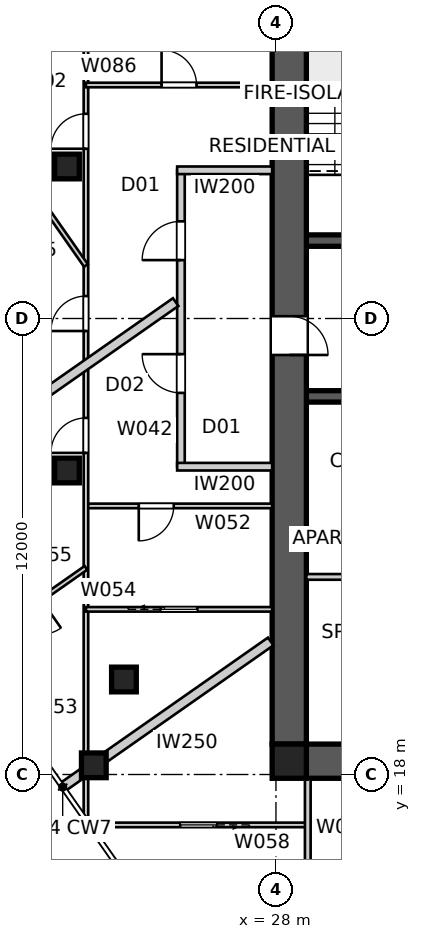
"""IFC4 building model, lengths in metres.
Left out: names, types, materials, properties, quantities, classifications, styles, units other than length and angle.
Written with IfcOpenShell. Run it as: python <this file> out.ifc"""

import sys

from ifc_helpers import new_model, si_unit, direction, frame, frame_2d, origin, origin_2d, place, context, subcontext, project, spatial, polyline, rectangle, outline, extrude, element, fill, save


model = new_model("IFC4")
c1 = context("Model", 3, precision=1e-05, world=origin(), true_north=direction((0.0, 1.0)))
c2 = subcontext(c1, "Body", "Model", "MODEL_VIEW")
j1 = project(units=[si_unit("LENGTHUNIT", "METRE"), si_unit("PLANEANGLEUNIT", "RADIAN")], contexts=[c1])
p1 = place(None, origin())
s1 = spatial("IfcSite", under=j1, at=p1, CompositionType="ELEMENT")
p2 = place(p1, origin())
s2 = spatial("IfcBuilding", under=s1, at=p2, CompositionType="ELEMENT")
p3 = place(p2, frame((0.0, 0.0, 247.2)))
s3 = spatial("IfcBuildingStorey", under=s2, at=p3, CompositionType="ELEMENT", Elevation=247.2)
p4 = place(p3, frame((51.2, 18.35, 0.0), z_axis=(0.0, 0.0, 1.0), x_axis=(-1.0, 0.0, 0.0)))
e1 = element("IfcWall", 1, at=p4, inside=s3, PredefinedType="SHEAR", context=c2, shape_type="SweptSolid", body=[
    extrude(outline(polyline([(0.0, -0.45), (22.4, -0.45), (22.4, -0.025), (22.85, -0.025), (22.85, 0.025), (22.4, 0.025), (22.4, 0.45), (0.0, 0.45), (0.0, 0.025), (-0.45, 0.025), (-0.45, -0.025), (0.0, -0.025), (0.0, -0.45)])), origin(), (0.0, 0.0, 1.0), 3.4),
])
p5 = place(p3, frame((28.35, 41.2, 0.0), z_axis=(0.0, 0.0, 1.0), x_axis=(0.0, -1.0, 0.0)))
e2 = element("IfcWall", 2, at=p5, inside=s3, PredefinedType="SHEAR", context=c2, shape_type="SweptSolid", body=[
    extrude(outline(polyline([(0.0, -0.45), (22.4, -0.45), (22.4, -0.025), (22.85, -0.025), (22.85, 0.025), (22.4, 0.025), (22.4, 0.45), (0.0, 0.45), (0.0, 0.025), (-0.45, 0.025), (-0.45, -0.025), (0.0, -0.025), (0.0, -0.45)])), origin(), (0.0, 0.0, 1.0), 3.4),
])
p6 = place(p5, frame((11.14, 0.0, 0.0)))
e3 = element("IfcOpeningElement", 3, at=p6, cuts=e2, PredefinedType="OPENING", context=c2, shape_type="SweptSolid", body=[
    extrude(rectangle(XDim=1.02, YDim=2.4, at=frame_2d((0.51, 1.2))), frame((0.0, 0.46, 0.0), z_axis=(0.0, -1.0, 0.0), x_axis=(1.0, 0.0, 0.0)), (0.0, 0.0, 1.0), 0.92),
])
p7 = place(p3, frame((28.8, 32.05, 0.0), z_axis=(0.0, 0.0, 1.0), x_axis=(1.0, 0.0, 0.0)))
e4 = element("IfcWall", 4, at=p7, inside=s3, PredefinedType="SHEAR", context=c2, shape_type="SweptSolid", body=[
    extrude(rectangle(XDim=22.4, YDim=0.3, at=frame_2d((11.2, 0.0))), origin(), (0.0, 0.0, 1.0), 3.4),
])
p8 = place(p7, frame((19.04, 0.0, 0.0)))
e5 = element("IfcOpeningElement", 5, at=p8, cuts=e4, PredefinedType="OPENING", context=c2, shape_type="SweptSolid", body=[
    extrude(rectangle(XDim=0.92, YDim=2.1, at=frame_2d((0.46, 1.05))), frame((0.0, 0.16, 0.0), z_axis=(0.0, -1.0, 0.0), x_axis=(1.0, 0.0, 0.0)), (0.0, 0.0, 1.0), 0.32),
])
p9 = place(p7, frame((1.265, 0.0, 0.0)))
e6 = element("IfcOpeningElement", 6, at=p9, cuts=e4, PredefinedType="OPENING", context=c2, shape_type="SweptSolid", body=[
    extrude(rectangle(XDim=1.02, YDim=2.1, at=frame_2d((0.51, 1.05))), frame((0.0, 0.16, 0.0), z_axis=(0.0, -1.0, 0.0), x_axis=(1.0, 0.0, 0.0)), (0.0, 0.0, 1.0), 0.32),
])
p10 = place(p7, frame((4.015, 0.0, 0.0)))
e7 = element("IfcOpeningElement", 7, at=p10, cuts=e4, PredefinedType="OPENING", context=c2, shape_type="SweptSolid", body=[
    extrude(rectangle(XDim=0.92, YDim=2.1, at=frame_2d((0.46, 1.05))), frame((0.0, 0.16, 0.0), z_axis=(0.0, -1.0, 0.0), x_axis=(1.0, 0.0, 0.0)), (0.0, 0.0, 1.0), 0.32),
])
p11 = place(p7, frame((7.015, 0.0, 0.0)))
e8 = element("IfcOpeningElement", 8, at=p11, cuts=e4, PredefinedType="OPENING", context=c2, shape_type="SweptSolid", body=[
    extrude(rectangle(XDim=0.92, YDim=2.1, at=frame_2d((0.46, 1.05))), frame((0.0, 0.16, 0.0), z_axis=(0.0, -1.0, 0.0), x_axis=(1.0, 0.0, 0.0)), (0.0, 0.0, 1.0), 0.32),
])
p12 = place(p7, frame((9.34, 0.0, 0.0)))
e9 = element("IfcOpeningElement", 9, at=p12, cuts=e4, PredefinedType="OPENING", context=c2, shape_type="SweptSolid", body=[
    extrude(rectangle(XDim=0.92, YDim=2.1, at=frame_2d((0.46, 1.05))), frame((0.0, 0.16, 0.0), z_axis=(0.0, -1.0, 0.0), x_axis=(1.0, 0.0, 0.0)), (0.0, 0.0, 1.0), 0.32),
])
p13 = place(p7, frame((12.05, 0.0, 0.0)))
e10 = element("IfcOpeningElement", 10, at=p13, cuts=e4, PredefinedType="OPENING", context=c2, shape_type="SweptSolid", body=[
    extrude(rectangle(XDim=1.1, YDim=2.1, at=frame_2d((0.55, 1.05))), frame((0.0, 0.16, 0.0), z_axis=(0.0, -1.0, 0.0), x_axis=(1.0, 0.0, 0.0)), (0.0, 0.0, 1.0), 0.32),
])
p14 = place(p7, frame((14.85, 0.0, 0.0)))
e11 = element("IfcOpeningElement", 11, at=p14, cuts=e4, PredefinedType="OPENING", context=c2, shape_type="SweptSolid", body=[
    extrude(rectangle(XDim=1.1, YDim=2.1, at=frame_2d((0.55, 1.05))), frame((0.0, 0.16, 0.0), z_axis=(0.0, -1.0, 0.0), x_axis=(1.0, 0.0, 0.0)), (0.0, 0.0, 1.0), 0.32),
])
p15 = place(p3, frame((51.2, 27.95, 0.0), z_axis=(0.0, 0.0, 1.0), x_axis=(-1.0, 0.0, 0.0)))
e12 = element("IfcWall", 12, at=p15, inside=s3, PredefinedType="SHEAR", context=c2, shape_type="SweptSolid", body=[
    extrude(rectangle(XDim=22.4, YDim=0.3, at=frame_2d((11.2, 0.0))), origin(), (0.0, 0.0, 1.0), 3.4),
])
p16 = place(p15, frame((19.04, 0.0, 0.0)))
e13 = element("IfcOpeningElement", 13, at=p16, cuts=e12, PredefinedType="OPENING", context=c2, shape_type="SweptSolid", body=[
    extrude(rectangle(XDim=0.92, YDim=2.1, at=frame_2d((0.46, 1.05))), frame((0.0, 0.16, 0.0), z_axis=(0.0, -1.0, 0.0), x_axis=(1.0, 0.0, 0.0)), (0.0, 0.0, 1.0), 0.32),
])
p17 = place(p15, frame((1.265, 0.0, 0.0)))
e14 = element("IfcOpeningElement", 14, at=p17, cuts=e12, PredefinedType="OPENING", context=c2, shape_type="SweptSolid", body=[
    extrude(rectangle(XDim=1.02, YDim=2.1, at=frame_2d((0.51, 1.05))), frame((0.0, 0.16, 0.0), z_axis=(0.0, -1.0, 0.0), x_axis=(1.0, 0.0, 0.0)), (0.0, 0.0, 1.0), 0.32),
])
p18 = place(p15, frame((4.015, 0.0, 0.0)))
e15 = element("IfcOpeningElement", 15, at=p18, cuts=e12, PredefinedType="OPENING", context=c2, shape_type="SweptSolid", body=[
    extrude(rectangle(XDim=0.92, YDim=2.1, at=frame_2d((0.46, 1.05))), frame((0.0, 0.16, 0.0), z_axis=(0.0, -1.0, 0.0), x_axis=(1.0, 0.0, 0.0)), (0.0, 0.0, 1.0), 0.32),
])
p19 = place(p15, frame((9.79, 0.0, 0.0)))
e16 = element("IfcOpeningElement", 16, at=p19, cuts=e12, PredefinedType="OPENING", context=c2, shape_type="SweptSolid", body=[
    extrude(rectangle(XDim=0.92, YDim=2.1, at=frame_2d((0.46, 1.05))), frame((0.0, 0.16, 0.0), z_axis=(0.0, -1.0, 0.0), x_axis=(1.0, 0.0, 0.0)), (0.0, 0.0, 1.0), 0.32),
])
p20 = place(p15, frame((6.115, 0.0, 0.0)))
e17 = element("IfcOpeningElement", 17, at=p20, cuts=e12, PredefinedType="OPENING", context=c2, shape_type="SweptSolid", body=[
    extrude(rectangle(XDim=0.92, YDim=2.1, at=frame_2d((0.46, 1.05))), frame((0.0, 0.16, 0.0), z_axis=(0.0, -1.0, 0.0), x_axis=(1.0, 0.0, 0.0)), (0.0, 0.0, 1.0), 0.32),
])
p21 = place(p15, frame((12.05, 0.0, 0.0)))
e18 = element("IfcOpeningElement", 18, at=p21, cuts=e12, PredefinedType="OPENING", context=c2, shape_type="SweptSolid", body=[
    extrude(rectangle(XDim=1.1, YDim=2.1, at=frame_2d((0.55, 1.05))), frame((0.0, 0.16, 0.0), z_axis=(0.0, -1.0, 0.0), x_axis=(1.0, 0.0, 0.0)), (0.0, 0.0, 1.0), 0.32),
])
p22 = place(p15, frame((14.85, 0.0, 0.0)))
e19 = element("IfcOpeningElement", 19, at=p22, cuts=e12, PredefinedType="OPENING", context=c2, shape_type="SweptSolid", body=[
    extrude(rectangle(XDim=1.1, YDim=2.1, at=frame_2d((0.55, 1.05))), frame((0.0, 0.16, 0.0), z_axis=(0.0, -1.0, 0.0), x_axis=(1.0, 0.0, 0.0)), (0.0, 0.0, 1.0), 0.32),
])
p23 = place(p3, frame((28.35, 18.35, 0.0), z_axis=(0.0, 0.0, 1.0), x_axis=(1.0, 0.0, 0.0)))
e20 = element("IfcColumn", 20, at=p23, inside=s3, PredefinedType="COLUMN", context=c2, shape_type="SweptSolid", body=[
    extrude(rectangle(XDim=0.9, YDim=0.9, at=origin_2d()), origin(), (0.0, 0.0, 1.0), 3.4),
])
for number, where, z_axis, x_axis in (
    (21, (23.207, 18.242, 0.0), (0.0, 0.0, 1.0), (1.0, 0.0, 0.0)),
    (22, (22.5, 34.0, 0.0), (0.0, 0.0, 1.0), (1.0, 0.0, 0.0)),
    (23, (22.5, 26.0, 0.0), (0.0, 0.0, 1.0), (1.0, 0.0, 0.0)),
    (24, (24.0, 20.5, 0.0), (0.0, 0.0, 1.0), (1.0, 0.0, 0.0)),
):
    element("IfcColumn", number, at=place(p3, frame(where, z_axis=z_axis, x_axis=x_axis)), inside=s3, PredefinedType="COLUMN", context=c2, shape_type="SweptSolid", body=[
        extrude(rectangle(XDim=0.65, YDim=0.65, at=origin_2d()), origin(), (0.0, 0.0, 1.0), 3.4),
    ])
p24 = place(p3, frame((25.5, 26.1, 0.0), z_axis=(0.0, 0.0, 1.0), x_axis=(0.0, 1.0, 0.0)))
e25 = element("IfcWall", 25, at=p24, inside=s3, PredefinedType="PARTITIONING", context=c2, shape_type="SweptSolid", body=[
    extrude(rectangle(XDim=7.8, YDim=0.2, at=frame_2d((3.9, 0.0))), origin(), (0.0, 0.0, 1.0), 3.25),
])
p25 = place(p24, frame((1.942, 0.0, 0.0)))
e26 = element("IfcOpeningElement", 26, at=p25, cuts=e25, PredefinedType="OPENING", context=c2, shape_type="SweptSolid", body=[
    extrude(rectangle(XDim=1.02, YDim=2.34, at=frame_2d((0.51, 1.17))), frame((0.0, 0.11, 0.0), z_axis=(0.0, -1.0, 0.0), x_axis=(1.0, 0.0, 0.0)), (0.0, 0.0, 1.0), 0.22),
])
p26 = place(p24, frame((5.437, 0.0, 0.0)))
e27 = element("IfcOpeningElement", 27, at=p26, cuts=e25, PredefinedType="OPENING", context=c2, shape_type="SweptSolid", body=[
    extrude(rectangle(XDim=1.02, YDim=2.34, at=frame_2d((0.51, 1.17))), frame((0.0, 0.11, 0.0), z_axis=(0.0, -1.0, 0.0), x_axis=(1.0, 0.0, 0.0)), (0.0, 0.0, 1.0), 0.22),
])
for number, where, z_axis, x_axis in (
    (28, (27.9, 33.9, 0.0), (0.0, 0.0, 1.0), (-1.0, 0.0, 0.0)),
    (29, (27.9, 26.1, 0.0), (0.0, 0.0, 1.0), (-1.0, 0.0, 0.0)),
):
    element("IfcWall", number, at=place(p3, frame(where, z_axis=z_axis, x_axis=x_axis)), inside=s3, PredefinedType="PARTITIONING", context=c2, shape_type="SweptSolid", body=[
        extrude(rectangle(XDim=2.5, YDim=0.2, at=frame_2d((1.25, 0.0))), origin(), (0.0, 0.0, 1.0), 3.25),
    ])
p27 = place(p3, frame((22.388, 17.668, 0.0), z_axis=(0.0, 0.0, 1.0), x_axis=(0.819161528122, 0.573562891796, 0.0)))
e30 = element("IfcWall", 30, at=p27, inside=s3, PredefinedType="PARTITIONING", context=c2, shape_type="SweptSolid", body=[
    extrude(rectangle(XDim=6.681, YDim=0.25, at=frame_2d((3.341, 0.0))), origin(), (0.0, 0.0, 1.0), 3.25),
])
p28 = place(p3, frame((17.369, 24.836, 0.0), z_axis=(0.0, 0.0, 1.0), x_axis=(0.81915902312, 0.573566469418, 0.0)))
e31 = element("IfcWall", 31, at=p28, inside=s3, PredefinedType="PARTITIONING", context=c2, shape_type="SweptSolid", body=[
    extrude(rectangle(XDim=9.756, YDim=0.25, at=frame_2d((4.878, 0.0))), origin(), (0.0, 0.0, 1.0), 3.25),
])
p29 = place(p3, frame((32.4, 23.2, 0.0), z_axis=(0.0, 0.0, 1.0), x_axis=(-1.0, 0.0, 0.0)))
e32 = element("IfcWall", 32, at=p29, inside=s3, PredefinedType="SOLIDWALL", context=c2, shape_type="SweptSolid", body=[
    extrude(rectangle(XDim=3.6, YDim=0.15, at=frame_2d((1.8, 0.0))), origin(), (0.0, 0.0, 1.0), 3.25),
])
p30 = place(p29, frame((1.34, 0.0, 0.0)))
e33 = element("IfcOpeningElement", 33, at=p30, cuts=e32, PredefinedType="OPENING", context=c2, shape_type="SweptSolid", body=[
    extrude(rectangle(XDim=0.92, YDim=2.1, at=frame_2d((0.46, 1.05))), frame((0.0, 0.085, 0.0), z_axis=(0.0, -1.0, 0.0), x_axis=(1.0, 0.0, 0.0)), (0.0, 0.0, 1.0), 0.17),
])
p31 = place(p3, frame((27.9, 25.068, 0.0), z_axis=(0.0, 0.0, 1.0), x_axis=(-1.0, 0.0, 0.0)))
e34 = element("IfcWall", 34, at=p31, inside=s3, PredefinedType="PARTITIONING", context=c2, shape_type="SweptSolid", body=[
    extrude(rectangle(XDim=4.9, YDim=0.12, at=frame_2d((2.45, 0.0))), origin(), (0.0, 0.0, 1.0), 3.25),
])
p32 = place(p31, frame((2.59, 0.0, 0.0)))
e35 = element("IfcOpeningElement", 35, at=p32, cuts=e34, PredefinedType="OPENING", context=c2, shape_type="SweptSolid", body=[
    extrude(rectangle(XDim=0.92, YDim=2.34, at=frame_2d((0.46, 1.17))), frame((0.0, 0.07, 0.0), z_axis=(0.0, -1.0, 0.0), x_axis=(1.0, 0.0, 0.0)), (0.0, 0.0, 1.0), 0.14),
])
p33 = place(p3, frame((23.0, 16.864, 0.0), z_axis=(0.0, 0.0, 1.0), x_axis=(0.0, 1.0, 0.0)))
e36 = element("IfcWall", 36, at=p33, inside=s3, PredefinedType="PARTITIONING", context=c2, shape_type="SweptSolid", body=[
    extrude(rectangle(XDim=26.824, YDim=0.12, at=frame_2d((13.412, 0.0))), origin(), (0.0, 0.0, 1.0), 2.55),
])
p34 = place(p33, frame((9.599, 0.0, 0.0)))
e37 = element("IfcOpeningElement", 37, at=p34, cuts=e36, PredefinedType="OPENING", context=c2, shape_type="SweptSolid", body=[
    extrude(rectangle(XDim=0.92, YDim=2.34, at=frame_2d((0.46, 1.17))), frame((0.0, 0.07, 0.0), z_axis=(0.0, -1.0, 0.0), x_axis=(1.0, 0.0, 0.0)), (0.0, 0.0, 1.0), 0.14),
])
p35 = place(p33, frame((17.603, 0.0, 0.0)))
e38 = element("IfcOpeningElement", 38, at=p35, cuts=e36, PredefinedType="OPENING", context=c2, shape_type="SweptSolid", body=[
    extrude(rectangle(XDim=0.92, YDim=2.34, at=frame_2d((0.46, 1.17))), frame((0.0, 0.07, 0.0), z_axis=(0.0, -1.0, 0.0), x_axis=(1.0, 0.0, 0.0)), (0.0, 0.0, 1.0), 0.14),
])
p36 = place(p33, frame((12.806, 0.0, 0.0)))
e39 = element("IfcOpeningElement", 39, at=p36, cuts=e36, PredefinedType="OPENING", context=c2, shape_type="SweptSolid", body=[
    extrude(rectangle(XDim=0.92, YDim=2.34, at=frame_2d((0.46, 1.17))), frame((0.0, 0.07, 0.0), z_axis=(0.0, -1.0, 0.0), x_axis=(1.0, 0.0, 0.0)), (0.0, 0.0, 1.0), 0.14),
])
p37 = place(p3, frame((23.0, 22.347, 0.0), z_axis=(0.0, 0.0, 1.0), x_axis=(1.0, 0.0, 0.0)))
e40 = element("IfcWall", 40, at=p37, inside=s3, PredefinedType="PARTITIONING", context=c2, shape_type="SweptSolid", body=[
    extrude(rectangle(XDim=4.9, YDim=0.12, at=frame_2d((2.45, 0.0))), origin(), (0.0, 0.0, 1.0), 3.25),
])
p38 = place(p37, frame((1.97, 0.0, 0.0)))
e41 = element("IfcOpeningElement", 41, at=p38, cuts=e40, PredefinedType="OPENING", context=c2, shape_type="SweptSolid", body=[
    extrude(rectangle(XDim=0.96, YDim=2.1, at=frame_2d((0.48, 1.05))), frame((0.0, 0.07, 0.0), z_axis=(0.0, -1.0, 0.0), x_axis=(1.0, 0.0, 0.0)), (0.0, 0.0, 1.0), 0.14),
])
p39 = place(p3, frame((23.0, 23.438, 0.0), z_axis=(0.0, 0.0, 1.0), x_axis=(-0.819140645834, -0.573592714688, 0.0)))
e42 = element("IfcWall", 42, at=p39, inside=s3, PredefinedType="PARTITIONING", context=c2, shape_type="SweptSolid", body=[
    extrude(rectangle(XDim=3.77, YDim=0.12, at=frame_2d((1.885, 0.0))), origin(), (0.0, 0.0, 1.0), 3.25),
])
p40 = place(p39, frame((1.445, 0.0, 0.0)))
e43 = element("IfcOpeningElement", 43, at=p40, cuts=e42, PredefinedType="OPENING", context=c2, shape_type="SweptSolid", body=[
    extrude(rectangle(XDim=0.92, YDim=2.34, at=frame_2d((0.46, 1.17))), frame((0.0, 0.07, 0.0), z_axis=(0.0, -1.0, 0.0), x_axis=(1.0, 0.0, 0.0)), (0.0, 0.0, 1.0), 0.14),
])
p41 = place(p3, frame((28.837, 16.673, 0.0), z_axis=(0.0, 0.0, 1.0), x_axis=(-1.0, 0.0, 0.0)))
e44 = element("IfcWall", 44, at=p41, inside=s3, PredefinedType="PARTITIONING", context=c2, shape_type="SweptSolid", body=[
    extrude(rectangle(XDim=5.704, YDim=0.12, at=frame_2d((2.852, 0.0))), origin(), (0.0, 0.0, 1.0), 3.25),
])
p42 = place(p41, frame((2.396, 0.0, 0.0)))
e45 = element("IfcOpeningElement", 45, at=p42, cuts=e44, PredefinedType="OPENING", context=c2, shape_type="SweptSolid", body=[
    extrude(rectangle(XDim=0.96, YDim=2.1, at=frame_2d((0.48, 1.05))), frame((0.0, 0.07, 0.0), z_axis=(0.0, -1.0, 0.0), x_axis=(1.0, 0.0, 0.0)), (0.0, 0.0, 1.0), 0.14),
])
p43 = place(p3, frame((28.837, 17.9, 0.0), z_axis=(0.0, 0.0, 1.0), x_axis=(0.0, -1.0, 0.0)))
e46 = element("IfcWall", 46, at=p43, inside=s3, PredefinedType="SOLIDWALL", context=c2, shape_type="SweptSolid", body=[
    extrude(rectangle(XDim=4.9, YDim=0.15, at=frame_2d((2.45, 0.0))), origin(), (0.0, 0.0, 1.0), 3.25),
])
p44 = place(p43, frame((2.603, 0.0, 0.0)))
e47 = element("IfcOpeningElement", 47, at=p44, cuts=e46, PredefinedType="OPENING", context=c2, shape_type="SweptSolid", body=[
    extrude(rectangle(XDim=0.92, YDim=2.34, at=frame_2d((0.46, 1.17))), frame((0.0, 0.085, 0.0), z_axis=(0.0, -1.0, 0.0), x_axis=(1.0, 0.0, 0.0)), (0.0, 0.0, 1.0), 0.17),
])
p45 = place(p3, frame((23.0, 36.145, 0.0), z_axis=(0.0, 0.0, 1.0), x_axis=(1.0, 0.0, 0.0)))
e48 = element("IfcWall", 48, at=p45, inside=s3, PredefinedType="PARTITIONING", context=c2, shape_type="SweptSolid", body=[
    extrude(rectangle(XDim=4.9, YDim=0.12, at=frame_2d((2.45, 0.0))), origin(), (0.0, 0.0, 1.0), 3.25),
])
p46 = place(p45, frame((1.99, 0.0, 0.0)))
e49 = element("IfcOpeningElement", 49, at=p46, cuts=e48, PredefinedType="OPENING", context=c2, shape_type="SweptSolid", body=[
    extrude(rectangle(XDim=0.92, YDim=2.34, at=frame_2d((0.46, 1.17))), frame((0.0, 0.07, 0.0), z_axis=(0.0, -1.0, 0.0), x_axis=(1.0, 0.0, 0.0)), (0.0, 0.0, 1.0), 0.14),
])
p47 = place(p3, frame((23.0, 31.396, 0.0), z_axis=(0.0, 0.0, 1.0), x_axis=(-0.573575545802, 0.819152667857, 0.0)))
e50 = element("IfcWall", 50, at=p47, inside=s3, PredefinedType="PARTITIONING", context=c2, shape_type="SweptSolid", body=[
    extrude(rectangle(XDim=10.566, YDim=0.12, at=frame_2d((5.283, 0.0))), origin(), (0.0, 0.0, 1.0), 3.25),
])
p48 = place(p47, frame((3.958, 0.0, 0.0)))
e51 = element("IfcOpeningElement", 51, at=p48, cuts=e50, PredefinedType="OPENING", context=c2, shape_type="SweptSolid", body=[
    extrude(rectangle(XDim=0.92, YDim=2.34, at=frame_2d((0.46, 1.17))), frame((0.0, 0.07, 0.0), z_axis=(0.0, -1.0, 0.0), x_axis=(1.0, 0.0, 0.0)), (0.0, 0.0, 1.0), 0.14),
])
p49 = place(p47, frame((8.121, 0.0, 0.0)))
e52 = element("IfcOpeningElement", 52, at=p49, cuts=e50, PredefinedType="OPENING", context=c2, shape_type="SweptSolid", body=[
    extrude(rectangle(XDim=0.92, YDim=2.34, at=frame_2d((0.46, 1.17))), frame((0.0, 0.07, 0.0), z_axis=(0.0, -1.0, 0.0), x_axis=(1.0, 0.0, 0.0)), (0.0, 0.0, 1.0), 0.14),
])
p50 = place(p25, origin())
e53 = element("IfcDoor", 53, at=p50, inside=s3, OperationType="SINGLE_SWING_RIGHT", PredefinedType="DOOR", context=c2, shape_type="SweptSolid", body=[
    extrude(rectangle(XDim=1.02, YDim=2.34, at=frame_2d((0.51, 1.17))), frame((0.0, 0.025, 0.0), z_axis=(0.0, -1.0, 0.0), x_axis=(1.0, 0.0, 0.0)), (0.0, 0.0, 1.0), 0.05),
])
fill(e26, e53)
p51 = place(p26, origin())
e54 = element("IfcDoor", 54, at=p51, inside=s3, OperationType="SINGLE_SWING_LEFT", PredefinedType="DOOR", context=c2, shape_type="SweptSolid", body=[
    extrude(rectangle(XDim=1.02, YDim=2.34, at=frame_2d((0.51, 1.17))), frame((0.0, 0.025, 0.0), z_axis=(0.0, -1.0, 0.0), x_axis=(1.0, 0.0, 0.0)), (0.0, 0.0, 1.0), 0.05),
])
fill(e27, e54)
p52 = place(p32, origin())
e55 = element("IfcDoor", 55, at=p52, inside=s3, OperationType="SINGLE_SWING_RIGHT", PredefinedType="DOOR", context=c2, shape_type="SweptSolid", body=[
    extrude(rectangle(XDim=0.92, YDim=2.34, at=frame_2d((0.46, 1.17))), frame((0.0, 0.025, 0.0), z_axis=(0.0, -1.0, 0.0), x_axis=(1.0, 0.0, 0.0)), (0.0, 0.0, 1.0), 0.05),
])
fill(e35, e55)
p53 = place(p34, origin())
e56 = element("IfcDoor", 56, at=p53, inside=s3, OperationType="SINGLE_SWING_LEFT", PredefinedType="DOOR", context=c2, shape_type="SweptSolid", body=[
    extrude(rectangle(XDim=0.92, YDim=2.34, at=frame_2d((0.46, 1.17))), frame((0.0, 0.025, 0.0), z_axis=(0.0, -1.0, 0.0), x_axis=(1.0, 0.0, 0.0)), (0.0, 0.0, 1.0), 0.05),
])
fill(e37, e56)
p54 = place(p46, origin())
e57 = element("IfcDoor", 57, at=p54, inside=s3, OperationType="SINGLE_SWING_LEFT", PredefinedType="DOOR", context=c2, shape_type="SweptSolid", body=[
    extrude(rectangle(XDim=0.92, YDim=2.34, at=frame_2d((0.46, 1.17))), frame((0.0, 0.025, 0.0), z_axis=(0.0, -1.0, 0.0), x_axis=(1.0, 0.0, 0.0)), (0.0, 0.0, 1.0), 0.05),
])
fill(e49, e57)
p55 = place(p35, origin())
e58 = element("IfcDoor", 58, at=p55, inside=s3, OperationType="SINGLE_SWING_LEFT", PredefinedType="DOOR", context=c2, shape_type="SweptSolid", body=[
    extrude(rectangle(XDim=0.92, YDim=2.34, at=frame_2d((0.46, 1.17))), frame((0.0, 0.025, 0.0), z_axis=(0.0, -1.0, 0.0), x_axis=(1.0, 0.0, 0.0)), (0.0, 0.0, 1.0), 0.05),
])
fill(e38, e58)
p56 = place(p36, origin())
e59 = element("IfcDoor", 59, at=p56, inside=s3, OperationType="SINGLE_SWING_LEFT", PredefinedType="DOOR", context=c2, shape_type="SweptSolid", body=[
    extrude(rectangle(XDim=0.92, YDim=2.34, at=frame_2d((0.46, 1.17))), frame((0.0, 0.025, 0.0), z_axis=(0.0, -1.0, 0.0), x_axis=(1.0, 0.0, 0.0)), (0.0, 0.0, 1.0), 0.05),
])
fill(e39, e59)
p57 = place(p38, origin())
e60 = element("IfcDoor", 60, at=p57, inside=s3, OperationType="SLIDING_TO_LEFT", PredefinedType="DOOR", context=c2, shape_type="SweptSolid", body=[
    extrude(rectangle(XDim=0.96, YDim=2.1, at=frame_2d((0.48, 1.05))), frame((0.0, 0.025, 0.0), z_axis=(0.0, -1.0, 0.0), x_axis=(1.0, 0.0, 0.0)), (0.0, 0.0, 1.0), 0.05),
])
fill(e41, e60)
p58 = place(p42, origin())
e61 = element("IfcDoor", 61, at=p58, inside=s3, OperationType="SLIDING_TO_LEFT", PredefinedType="DOOR", context=c2, shape_type="SweptSolid", body=[
    extrude(rectangle(XDim=0.96, YDim=2.1, at=frame_2d((0.48, 1.05))), frame((0.0, 0.025, 0.0), z_axis=(0.0, -1.0, 0.0), x_axis=(1.0, 0.0, 0.0)), (0.0, 0.0, 1.0), 0.05),
])
fill(e45, e61)
p59 = place(p6, origin())
e62 = element("IfcDoor", 62, at=p59, inside=s3, OperationType="SINGLE_SWING_RIGHT", PredefinedType="DOOR", context=c2, shape_type="SweptSolid", body=[
    extrude(rectangle(XDim=1.02, YDim=2.4, at=frame_2d((0.51, 1.2))), frame((0.0, 0.025, 0.0), z_axis=(0.0, -1.0, 0.0), x_axis=(1.0, 0.0, 0.0)), (0.0, 0.0, 1.0), 0.05),
])
fill(e3, e62)
save(model, sys.argv[1])
